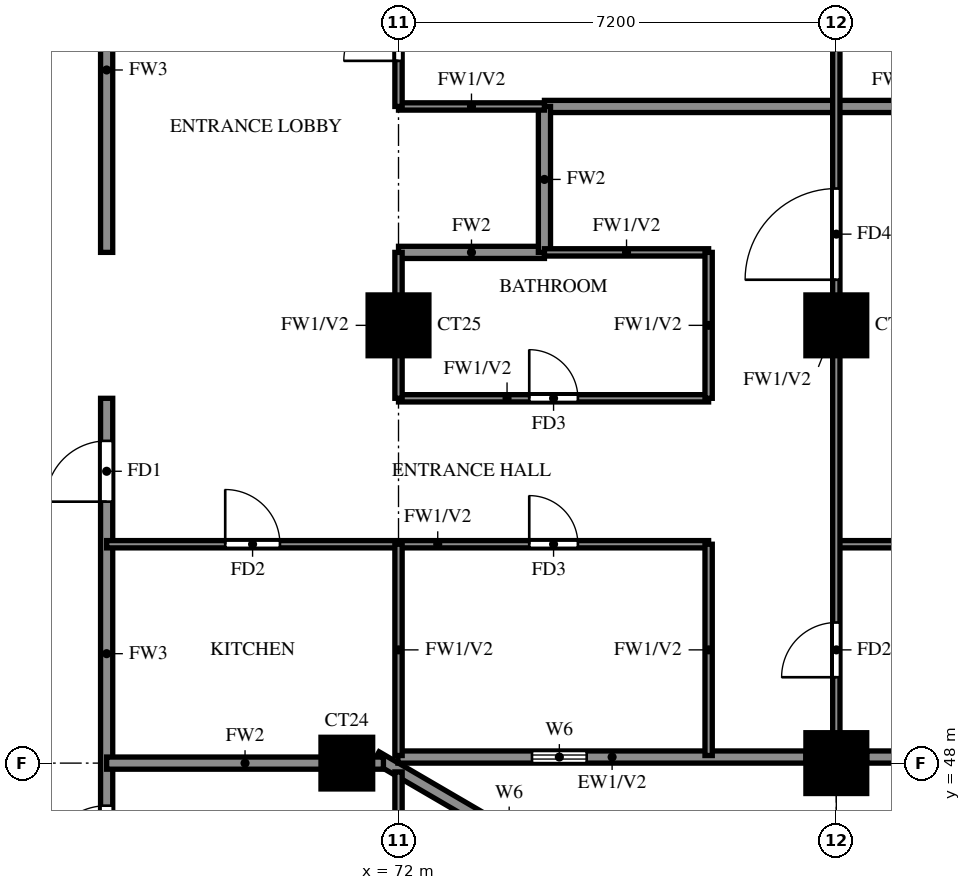
"""IFC4 building model, lengths in metres.
Left out: names, types, materials, properties, quantities, classifications, styles, units other than length and angle.
Written with IfcOpenShell. Run it as: python <this file> out.ifc"""

import sys

from ifc_helpers import new_model, si_unit, direction, frame, frame_2d, origin, origin_2d, place, context, subcontext, project, spatial, rectangle, extrude, source, transform, mapped, element, fill, save


model = new_model("IFC4")
c1 = context("Model", 3, precision=1e-05, world=origin(), true_north=direction((0.0, 1.0)))
c2 = subcontext(c1, "Body", "Model", "MODEL_VIEW")
j1 = project(units=[si_unit("LENGTHUNIT", "METRE"), si_unit("PLANEANGLEUNIT", "RADIAN")], contexts=[c1])
p1 = place(None, origin())
s1 = spatial("IfcSite", under=j1, at=p1, CompositionType="ELEMENT")
p2 = place(p1, origin())
s2 = spatial("IfcBuilding", under=s1, at=p2, CompositionType="ELEMENT")
p3 = place(p2, frame((0.0, 0.0, 143.0)))
s3 = spatial("IfcBuildingStorey", under=s2, at=p3, CompositionType="ELEMENT", Elevation=143.0)
m1 = source(origin(), c2, "Body", "SweptSolid", [
    extrude(rectangle(XDim=0.85, YDim=0.85, at=origin_2d()), origin(), (0.0, 0.0, 1.0), 3.2),
])
p4 = place(p3, frame((71.15, 48.0, 0.0), z_axis=(0.0, 0.0, 1.0), x_axis=(1.0, 0.0, 0.0)))
e1 = element("IfcColumn", 1, at=p4, inside=s3, PredefinedType="COLUMN", context=c2, shape_type="MappedRepresentation", body=[
    mapped(m1, transform((0.0, 0.0, 0.0))),
])
m2 = source(origin(), c2, "Body", "SweptSolid", [
    extrude(rectangle(XDim=1.0, YDim=1.0, at=origin_2d()), origin(), (0.0, 0.0, 1.0), 3.2),
])
for number, where, z_axis, x_axis in (
    (2, (79.2, 48.0, 0.0), (0.0, 0.0, 1.0), (1.0, 0.0, 0.0)),
    (3, (72.0, 55.2, 0.0), (0.0, 0.0, 1.0), (1.0, 0.0, 0.0)),
    (4, (79.2, 55.2, 0.0), (0.0, 0.0, 1.0), (1.0, 0.0, 0.0)),
):
    element("IfcColumn", number, at=place(p3, frame(where, z_axis=z_axis, x_axis=x_axis)), inside=s3, PredefinedType="COLUMN", context=c2, shape_type="MappedRepresentation", body=[
        mapped(m2, transform((0.0, 0.0, 0.0))),
    ])
p5 = place(p3, frame((85.719, 39.881, 0.0), z_axis=(0.0, 0.0, 1.0), x_axis=(-0.86377618652, 0.503875678716, 0.0)))
e5 = element("IfcWall", 5, at=p5, inside=s3, PredefinedType="SOLIDWALL", context=c2, shape_type="SweptSolid", body=[
    extrude(rectangle(XDim=16.311, YDim=0.2, at=frame_2d((8.156, 0.0))), origin(), (0.0, 0.0, 1.0), 3.2),
])
p6 = place(p5, frame((13.326, 0.0, 1.5)))
e6 = element("IfcOpeningElement", 6, at=p6, cuts=e5, PredefinedType="OPENING", context=c2, shape_type="SweptSolid", body=[
    extrude(rectangle(XDim=0.9, YDim=0.9, at=frame_2d((0.45, 0.45))), frame((0.0, 0.11, 0.0), z_axis=(0.0, -1.0, 0.0), x_axis=(1.0, 0.0, 0.0)), (0.0, 0.0, 1.0), 0.22),
])
p7 = place(p3, frame((71.99, 48.1, 0.0), z_axis=(0.0, 0.0, 1.0), x_axis=(1.0, 0.0, 0.0)))
e7 = element("IfcWall", 7, at=p7, inside=s3, PredefinedType="SOLIDWALL", context=c2, shape_type="SweptSolid", body=[
    extrude(rectangle(XDim=6.71, YDim=0.2, at=frame_2d((3.355, 0.0))), origin(), (0.0, 0.0, 1.0), 3.2),
])
p8 = place(p7, frame((2.205, 0.0, 1.5)))
e8 = element("IfcOpeningElement", 8, at=p8, cuts=e7, PredefinedType="OPENING", context=c2, shape_type="SweptSolid", body=[
    extrude(rectangle(XDim=0.9, YDim=0.9, at=frame_2d((0.45, 0.45))), frame((0.0, 0.11, 0.0), z_axis=(0.0, -1.0, 0.0), x_axis=(1.0, 0.0, 0.0)), (0.0, 0.0, 1.0), 0.22),
])
p9 = place(p3, frame((79.7, 48.1, 0.0), z_axis=(0.0, 0.0, 1.0), x_axis=(1.0, 0.0, 0.0)))
e9 = element("IfcWall", 9, at=p9, inside=s3, PredefinedType="SOLIDWALL", context=c2, shape_type="SweptSolid", body=[
    extrude(rectangle(XDim=5.675, YDim=0.2, at=frame_2d((2.837, 0.0))), origin(), (0.0, 0.0, 1.0), 3.2),
])
p10 = place(p9, frame((1.637, 0.0, 0.6)))
e10 = element("IfcOpeningElement", 10, at=p10, cuts=e9, PredefinedType="OPENING", context=c2, shape_type="SweptSolid", body=[
    extrude(rectangle(XDim=2.4, YDim=2.4, at=frame_2d((1.2, 1.2))), frame((0.0, 0.11, 0.0), z_axis=(0.0, -1.0, 0.0), x_axis=(1.0, 0.0, 0.0)), (0.0, 0.0, 1.0), 0.22),
])
p11 = place(p3, frame((67.2, 45.6, 0.0), z_axis=(0.0, 0.0, 1.0), x_axis=(0.0, 1.0, 0.0)))
e11 = element("IfcWall", 11, at=p11, inside=s3, PredefinedType="SOLIDWALL", context=c2, shape_type="SweptSolid", body=[
    extrude(rectangle(XDim=8.4, YDim=0.2, at=frame_2d((4.2, 0.0))), origin(), (0.0, 0.0, 1.0), 3.2),
])
p12 = place(p11, frame((6.7, 0.0, 0.0)))
e12 = element("IfcOpeningElement", 12, at=p12, cuts=e11, PredefinedType="OPENING", context=c2, shape_type="SweptSolid", body=[
    extrude(rectangle(XDim=1.0, YDim=2.1, at=frame_2d((0.5, 1.05))), frame((0.0, 0.11, 0.0), z_axis=(0.0, -1.0, 0.0), x_axis=(1.0, 0.0, 0.0)), (0.0, 0.0, 1.0), 0.22),
])
p13 = place(p11, frame((0.7, 0.0, 0.0)))
e13 = element("IfcOpeningElement", 13, at=p13, cuts=e11, PredefinedType="OPENING", context=c2, shape_type="SweptSolid", body=[
    extrude(rectangle(XDim=1.0, YDim=2.1, at=frame_2d((0.5, 1.05))), frame((0.0, 0.11, 0.0), z_axis=(0.0, -1.0, 0.0), x_axis=(1.0, 0.0, 0.0)), (0.0, 0.0, 1.0), 0.22),
])
p14 = place(p3, frame((67.2, 56.4, 0.0), z_axis=(0.0, 0.0, 1.0), x_axis=(0.0, 1.0, 0.0)))
e14 = element("IfcWall", 14, at=p14, inside=s3, PredefinedType="SOLIDWALL", context=c2, shape_type="SweptSolid", body=[
    extrude(rectangle(XDim=6.0, YDim=0.2, at=frame_2d((3.0, 0.0))), origin(), (0.0, 0.0, 1.0), 3.2),
])
p15 = place(p14, frame((3.7, 0.0, 0.0)))
e15 = element("IfcOpeningElement", 15, at=p15, cuts=e14, PredefinedType="OPENING", context=c2, shape_type="SweptSolid", body=[
    extrude(rectangle(XDim=1.0, YDim=2.1, at=frame_2d((0.5, 1.05))), frame((0.0, 0.11, 0.0), z_axis=(0.0, -1.0, 0.0), x_axis=(1.0, 0.0, 0.0)), (0.0, 0.0, 1.0), 0.22),
])
p16 = place(p3, frame((67.2, 48.0, 0.0), z_axis=(0.0, 0.0, 1.0), x_axis=(1.0, 0.0, 0.0)))
e16 = element("IfcWall", 16, at=p16, inside=s3, PredefinedType="SOLIDWALL", context=c2, shape_type="SweptSolid", body=[
    extrude(rectangle(XDim=4.552, YDim=0.2, at=frame_2d((2.276, 0.0))), origin(), (0.0, 0.0, 1.0), 3.2),
])
p17 = place(p3, frame((72.0, 56.4, 0.0), z_axis=(0.0, 0.0, 1.0), x_axis=(1.0, 0.0, 0.0)))
e17 = element("IfcWall", 17, at=p17, inside=s3, PredefinedType="SOLIDWALL", context=c2, shape_type="SweptSolid", body=[
    extrude(rectangle(XDim=2.4, YDim=0.2, at=frame_2d((1.2, 0.0))), origin(), (0.0, 0.0, 1.0), 3.2),
])
p18 = place(p3, frame((74.4, 58.8, 0.0), z_axis=(0.0, 0.0, 1.0), x_axis=(1.0, 0.0, 0.0)))
e18 = element("IfcWall", 18, at=p18, inside=s3, PredefinedType="SOLIDWALL", context=c2, shape_type="SweptSolid", body=[
    extrude(rectangle(XDim=11.875, YDim=0.2, at=frame_2d((5.938, 0.0))), origin(), (0.0, 0.0, 1.0), 2.3),
])
p19 = place(p3, frame((74.4, 56.4, 0.0), z_axis=(0.0, 0.0, 1.0), x_axis=(0.0, 1.0, 0.0)))
e19 = element("IfcWall", 19, at=p19, inside=s3, PredefinedType="SOLIDWALL", context=c2, shape_type="SweptSolid", body=[
    extrude(rectangle(XDim=2.4, YDim=0.2, at=frame_2d((1.2, 0.0))), origin(), (0.0, 0.0, 1.0), 3.2),
])
p20 = place(p3, frame((67.2, 51.6, 0.0), z_axis=(0.0, 0.0, 1.0), x_axis=(1.0, 0.0, 0.0)))
e20 = element("IfcWall", 20, at=p20, inside=s3, PredefinedType="PARTITIONING", context=c2, shape_type="SweptSolid", body=[
    extrude(rectangle(XDim=9.9, YDim=0.12, at=frame_2d((4.95, 0.0))), origin(), (0.0, 0.0, 1.0), 3.2),
])
p21 = place(p20, frame((6.95, 0.0, 0.0)))
e21 = element("IfcOpeningElement", 21, at=p21, cuts=e20, PredefinedType="OPENING", context=c2, shape_type="SweptSolid", body=[
    extrude(rectangle(XDim=0.8, YDim=2.1, at=frame_2d((0.4, 1.05))), frame((0.0, 0.07, 0.0), z_axis=(0.0, -1.0, 0.0), x_axis=(1.0, 0.0, 0.0)), (0.0, 0.0, 1.0), 0.14),
])
p22 = place(p20, frame((1.95, 0.0, 0.0)))
e22 = element("IfcOpeningElement", 22, at=p22, cuts=e20, PredefinedType="OPENING", context=c2, shape_type="SweptSolid", body=[
    extrude(rectangle(XDim=0.9, YDim=2.1, at=frame_2d((0.45, 1.05))), frame((0.0, 0.07, 0.0), z_axis=(0.0, -1.0, 0.0), x_axis=(1.0, 0.0, 0.0)), (0.0, 0.0, 1.0), 0.14),
])
p23 = place(p3, frame((79.2, 51.6, 0.0), z_axis=(0.0, 0.0, 1.0), x_axis=(1.0, 0.0, 0.0)))
e23 = element("IfcWall", 23, at=p23, inside=s3, PredefinedType="PARTITIONING", context=c2, shape_type="SweptSolid", body=[
    extrude(rectangle(XDim=7.075, YDim=0.12, at=frame_2d((3.538, 0.0))), origin(), (0.0, 0.0, 1.0), 2.3),
])
p24 = place(p3, frame((72.0, 54.0, 0.0), z_axis=(0.0, 0.0, 1.0), x_axis=(1.0, 0.0, 0.0)))
e24 = element("IfcWall", 24, at=p24, inside=s3, PredefinedType="PARTITIONING", context=c2, shape_type="SweptSolid", body=[
    extrude(rectangle(XDim=5.1, YDim=0.12, at=frame_2d((2.55, 0.0))), origin(), (0.0, 0.0, 1.0), 3.2),
])
p25 = place(p24, frame((2.15, 0.0, 0.0)))
e25 = element("IfcOpeningElement", 25, at=p25, cuts=e24, PredefinedType="OPENING", context=c2, shape_type="SweptSolid", body=[
    extrude(rectangle(XDim=0.8, YDim=2.1, at=frame_2d((0.4, 1.05))), frame((0.0, 0.07, 0.0), z_axis=(0.0, -1.0, 0.0), x_axis=(1.0, 0.0, 0.0)), (0.0, 0.0, 1.0), 0.14),
])
p26 = place(p3, frame((74.4, 56.4, 0.0), z_axis=(0.0, 0.0, 1.0), x_axis=(1.0, 0.0, 0.0)))
e26 = element("IfcWall", 26, at=p26, inside=s3, PredefinedType="PARTITIONING", context=c2, shape_type="SweptSolid", body=[
    extrude(rectangle(XDim=2.7, YDim=0.12, at=frame_2d((1.35, 0.0))), origin(), (0.0, 0.0, 1.0), 3.2),
])
p27 = place(p3, frame((72.0, 58.8, 0.0), z_axis=(0.0, 0.0, 1.0), x_axis=(1.0, 0.0, 0.0)))
e27 = element("IfcWall", 27, at=p27, inside=s3, PredefinedType="PARTITIONING", context=c2, shape_type="SweptSolid", body=[
    extrude(rectangle(XDim=2.4, YDim=0.12, at=frame_2d((1.2, 0.0))), origin(), (0.0, 0.0, 1.0), 3.2),
])
p28 = place(p3, frame((72.0, 39.725, 0.0), z_axis=(0.0, 0.0, 1.0), x_axis=(0.0, 1.0, 0.0)))
e28 = element("IfcWall", 28, at=p28, inside=s3, PredefinedType="PARTITIONING", context=c2, shape_type="SweptSolid", body=[
    extrude(rectangle(XDim=8.13, YDim=0.12, at=frame_2d((4.065, 0.0))), origin(), (0.0, 0.0, 1.0), 2.3),
])
p29 = place(p28, frame((1.788, 0.0, 0.0)))
e29 = element("IfcOpeningElement", 29, at=p29, cuts=e28, PredefinedType="OPENING", context=c2, shape_type="SweptSolid", body=[
    extrude(rectangle(XDim=1.5, YDim=2.1, at=frame_2d((0.75, 1.05))), frame((0.0, 0.07, 0.0), z_axis=(0.0, -1.0, 0.0), x_axis=(1.0, 0.0, 0.0)), (0.0, 0.0, 1.0), 0.14),
])
p30 = place(p28, frame((4.575, 0.0, 0.0)))
e30 = element("IfcOpeningElement", 30, at=p30, cuts=e28, PredefinedType="OPENING", context=c2, shape_type="SweptSolid", body=[
    extrude(rectangle(XDim=0.8, YDim=2.1, at=frame_2d((0.4, 1.05))), frame((0.0, 0.07, 0.0), z_axis=(0.0, -1.0, 0.0), x_axis=(1.0, 0.0, 0.0)), (0.0, 0.0, 1.0), 0.14),
])
p31 = place(p3, frame((72.0, 48.125, 0.0), z_axis=(0.0, 0.0, 1.0), x_axis=(0.0, 1.0, 0.0)))
e31 = element("IfcWall", 31, at=p31, inside=s3, PredefinedType="PARTITIONING", context=c2, shape_type="SweptSolid", body=[
    extrude(rectangle(XDim=3.475, YDim=0.12, at=frame_2d((1.738, 0.0))), origin(), (0.0, 0.0, 1.0), 3.2),
])
p32 = place(p3, frame((72.0, 54.0, 0.0), z_axis=(0.0, 0.0, 1.0), x_axis=(0.0, 1.0, 0.0)))
e32 = element("IfcWall", 32, at=p32, inside=s3, PredefinedType="PARTITIONING", context=c2, shape_type="SweptSolid", body=[
    extrude(rectangle(XDim=2.4, YDim=0.12, at=frame_2d((1.2, 0.0))), origin(), (0.0, 0.0, 1.0), 3.2),
])
p33 = place(p3, frame((72.0, 58.8, 0.0), z_axis=(0.0, 0.0, 1.0), x_axis=(0.0, 1.0, 0.0)))
e33 = element("IfcWall", 33, at=p33, inside=s3, PredefinedType="PARTITIONING", context=c2, shape_type="SweptSolid", body=[
    extrude(rectangle(XDim=3.6, YDim=0.12, at=frame_2d((1.8, 0.0))), origin(), (0.0, 0.0, 1.0), 3.2),
])
p34 = place(p33, frame((0.75, 0.0, 0.0)))
e34 = element("IfcOpeningElement", 34, at=p34, cuts=e33, PredefinedType="OPENING", context=c2, shape_type="SweptSolid", body=[
    extrude(rectangle(XDim=0.9, YDim=2.1, at=frame_2d((0.45, 1.05))), frame((0.0, 0.07, 0.0), z_axis=(0.0, -1.0, 0.0), x_axis=(1.0, 0.0, 0.0)), (0.0, 0.0, 1.0), 0.14),
])
p35 = place(p3, frame((77.1, 48.125, 0.0), z_axis=(0.0, 0.0, 1.0), x_axis=(0.0, 1.0, 0.0)))
e35 = element("IfcWall", 35, at=p35, inside=s3, PredefinedType="PARTITIONING", context=c2, shape_type="SweptSolid", body=[
    extrude(rectangle(XDim=3.475, YDim=0.12, at=frame_2d((1.738, 0.0))), origin(), (0.0, 0.0, 1.0), 3.2),
])
p36 = place(p3, frame((77.1, 54.0, 0.0), z_axis=(0.0, 0.0, 1.0), x_axis=(0.0, 1.0, 0.0)))
e36 = element("IfcWall", 36, at=p36, inside=s3, PredefinedType="PARTITIONING", context=c2, shape_type="SweptSolid", body=[
    extrude(rectangle(XDim=2.4, YDim=0.12, at=frame_2d((1.2, 0.0))), origin(), (0.0, 0.0, 1.0), 3.2),
])
p37 = place(p3, frame((79.2, 48.125, 0.0), z_axis=(0.0, 0.0, 1.0), x_axis=(0.0, 1.0, 0.0)))
e37 = element("IfcWall", 37, at=p37, inside=s3, PredefinedType="PARTITIONING", context=c2, shape_type="SweptSolid", body=[
    extrude(rectangle(XDim=14.275, YDim=0.12, at=frame_2d((7.137, 0.0))), origin(), (0.0, 0.0, 1.0), 3.2),
])
p38 = place(p37, frame((1.288, 0.0, 0.0)))
e38 = element("IfcOpeningElement", 38, at=p38, cuts=e37, PredefinedType="OPENING", context=c2, shape_type="SweptSolid", body=[
    extrude(rectangle(XDim=0.9, YDim=2.1, at=frame_2d((0.45, 1.05))), frame((0.0, 0.07, 0.0), z_axis=(0.0, -1.0, 0.0), x_axis=(1.0, 0.0, 0.0)), (0.0, 0.0, 1.0), 0.14),
])
p39 = place(p37, frame((7.825, 0.0, 0.0)))
e39 = element("IfcOpeningElement", 39, at=p39, cuts=e37, PredefinedType="OPENING", context=c2, shape_type="SweptSolid", body=[
    extrude(rectangle(XDim=1.5, YDim=2.1, at=frame_2d((0.75, 1.05))), frame((0.0, 0.07, 0.0), z_axis=(0.0, -1.0, 0.0), x_axis=(1.0, 0.0, 0.0)), (0.0, 0.0, 1.0), 0.14),
])
p40 = place(p37, frame((12.025, 0.0, 0.0)))
e40 = element("IfcOpeningElement", 40, at=p40, cuts=e37, PredefinedType="OPENING", context=c2, shape_type="SweptSolid", body=[
    extrude(rectangle(XDim=0.9, YDim=2.1, at=frame_2d((0.45, 1.05))), frame((0.0, 0.07, 0.0), z_axis=(0.0, -1.0, 0.0), x_axis=(1.0, 0.0, 0.0)), (0.0, 0.0, 1.0), 0.14),
])
p41 = place(p8, origin())
e41 = element("IfcWindow", 41, at=p41, inside=s3, PartitioningType="SINGLE_PANEL", PredefinedType="WINDOW", context=c2, shape_type="SweptSolid", body=[
    extrude(rectangle(XDim=0.9, YDim=0.9, at=frame_2d((0.45, 0.45))), frame((0.0, 0.03, 0.0), z_axis=(0.0, -1.0, 0.0), x_axis=(1.0, 0.0, 0.0)), (0.0, 0.0, 1.0), 0.06),
])
fill(e8, e41)
p42 = place(p12, origin())
e42 = element("IfcDoor", 42, at=p42, inside=s3, OperationType="SINGLE_SWING_LEFT", PredefinedType="DOOR", context=c2, shape_type="SweptSolid", body=[
    extrude(rectangle(XDim=1.0, YDim=2.1, at=frame_2d((0.5, 1.05))), frame((0.0, 0.025, 0.0), z_axis=(0.0, -1.0, 0.0), x_axis=(1.0, 0.0, 0.0)), (0.0, 0.0, 1.0), 0.05),
])
fill(e12, e42)
p43 = place(p38, origin())
e43 = element("IfcDoor", 43, at=p43, inside=s3, OperationType="SINGLE_SWING_LEFT", PredefinedType="DOOR", context=c2, shape_type="SweptSolid", body=[
    extrude(rectangle(XDim=0.9, YDim=2.1, at=frame_2d((0.45, 1.05))), frame((0.0, 0.025, 0.0), z_axis=(0.0, -1.0, 0.0), x_axis=(1.0, 0.0, 0.0)), (0.0, 0.0, 1.0), 0.05),
])
fill(e38, e43)
p44 = place(p39, origin())
e44 = element("IfcDoor", 44, at=p44, inside=s3, OperationType="SINGLE_SWING_LEFT", PredefinedType="DOOR", context=c2, shape_type="SweptSolid", body=[
    extrude(rectangle(XDim=1.5, YDim=2.1, at=frame_2d((0.75, 1.05))), frame((0.0, 0.025, 0.0), z_axis=(0.0, -1.0, 0.0), x_axis=(1.0, 0.0, 0.0)), (0.0, 0.0, 1.0), 0.05),
])
fill(e39, e44)
p45 = place(p21, origin())
e45 = element("IfcDoor", 45, at=p45, inside=s3, OperationType="SINGLE_SWING_LEFT", PredefinedType="DOOR", context=c2, shape_type="SweptSolid", body=[
    extrude(rectangle(XDim=0.8, YDim=2.1, at=frame_2d((0.4, 1.05))), frame((0.0, 0.025, 0.0), z_axis=(0.0, -1.0, 0.0), x_axis=(1.0, 0.0, 0.0)), (0.0, 0.0, 1.0), 0.05),
])
fill(e21, e45)
p46 = place(p25, origin())
e46 = element("IfcDoor", 46, at=p46, inside=s3, OperationType="SINGLE_SWING_LEFT", PredefinedType="DOOR", context=c2, shape_type="SweptSolid", body=[
    extrude(rectangle(XDim=0.8, YDim=2.1, at=frame_2d((0.4, 1.05))), frame((0.0, 0.025, 0.0), z_axis=(0.0, -1.0, 0.0), x_axis=(1.0, 0.0, 0.0)), (0.0, 0.0, 1.0), 0.05),
])
fill(e25, e46)
p47 = place(p22, origin())
e47 = element("IfcDoor", 47, at=p47, inside=s3, OperationType="SINGLE_SWING_RIGHT", PredefinedType="DOOR", context=c2, shape_type="SweptSolid", body=[
    extrude(rectangle(XDim=0.9, YDim=2.1, at=frame_2d((0.45, 1.05))), frame((0.0, 0.025, 0.0), z_axis=(0.0, -1.0, 0.0), x_axis=(1.0, 0.0, 0.0)), (0.0, 0.0, 1.0), 0.05),
])
fill(e22, e47)
p48 = place(p34, origin())
e48 = element("IfcDoor", 48, at=p48, inside=s3, OperationType="SINGLE_SWING_RIGHT", PredefinedType="DOOR", context=c2, shape_type="SweptSolid", body=[
    extrude(rectangle(XDim=0.9, YDim=2.1, at=frame_2d((0.45, 1.05))), frame((0.0, 0.025, 0.0), z_axis=(0.0, -1.0, 0.0), x_axis=(1.0, 0.0, 0.0)), (0.0, 0.0, 1.0), 0.05),
])
fill(e34, e48)
p49 = place(p13, origin())
e49 = element("IfcDoor", 49, at=p49, inside=s3, OperationType="SINGLE_SWING_LEFT", PredefinedType="DOOR", context=c2, shape_type="SweptSolid", body=[
    extrude(rectangle(XDim=1.0, YDim=2.1, at=frame_2d((0.5, 1.05))), frame((0.0, 0.025, 0.0), z_axis=(0.0, -1.0, 0.0), x_axis=(1.0, 0.0, 0.0)), (0.0, 0.0, 1.0), 0.05),
])
fill(e13, e49)
save(model, sys.argv[1])
